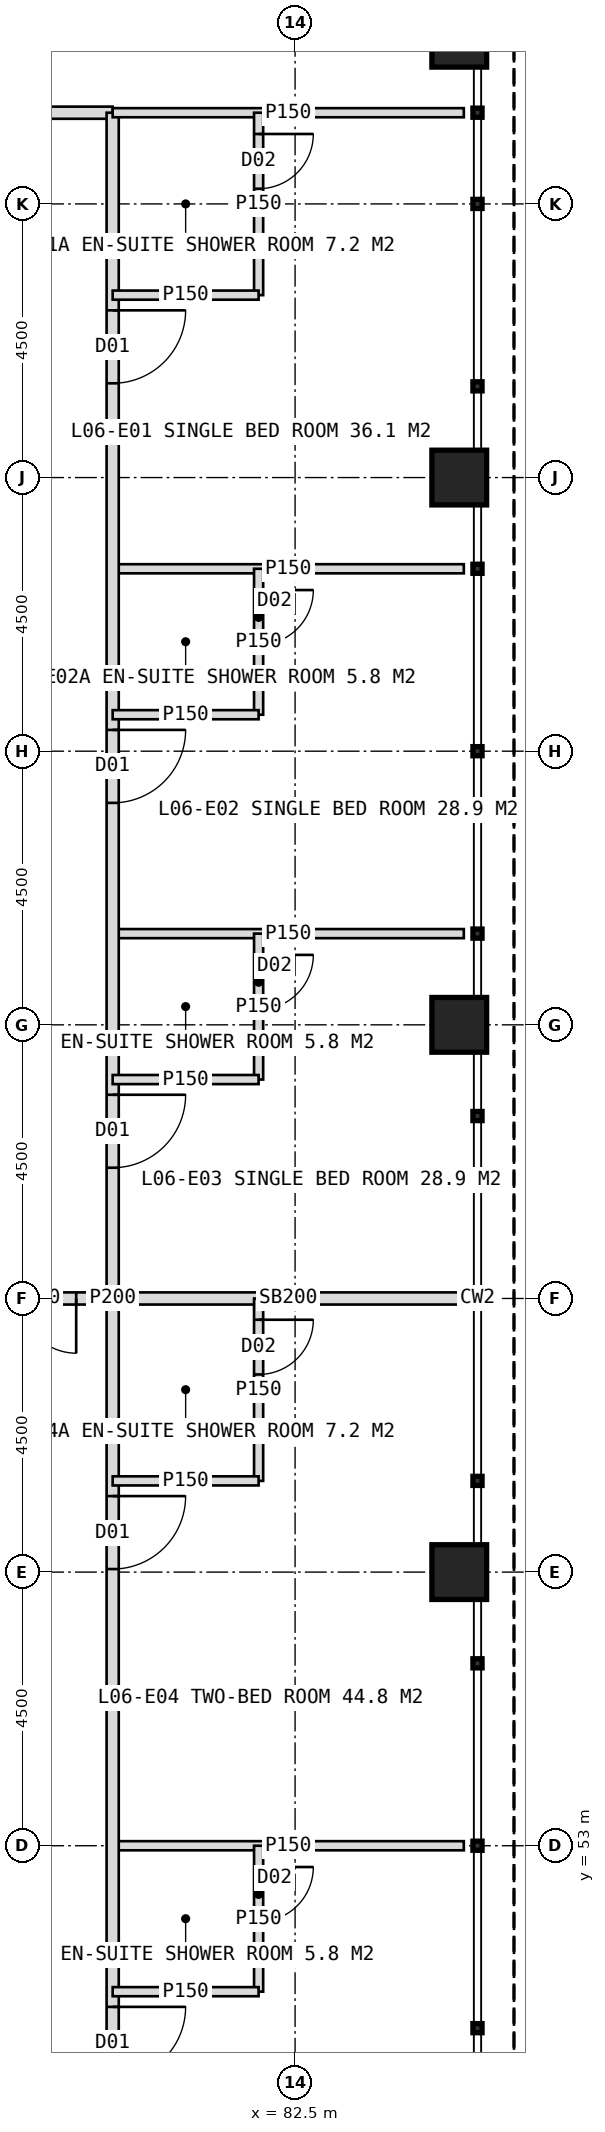
"""IFC4 building model, lengths in metres.
Left out: names, types, materials, properties, quantities, classifications, styles, units other than length and angle.
Written with IfcOpenShell. Run it as: python <this file> out.ifc"""

import sys

from ifc_helpers import new_model, si_unit, direction, frame, frame_2d, origin, origin_2d, place, context, subcontext, project, spatial, rectangle, hollow_rectangle, extrude, element, fill, save


model = new_model("IFC4")
c1 = context("Model", 3, precision=1e-05, world=origin(), true_north=direction((0.0, 1.0)))
c2 = subcontext(c1, "Body", "Model", "MODEL_VIEW")
j1 = project(units=[si_unit("LENGTHUNIT", "METRE"), si_unit("PLANEANGLEUNIT", "RADIAN")], contexts=[c1])
p1 = place(None, origin())
s1 = spatial("IfcSite", under=j1, at=p1, CompositionType="ELEMENT")
p2 = place(p1, origin())
s2 = spatial("IfcBuilding", under=s1, at=p2, CompositionType="ELEMENT")
p3 = place(p2, frame((0.0, 0.0, 31.0)))
s3 = spatial("IfcBuildingStorey", under=s2, at=p3, CompositionType="ELEMENT", Elevation=31.0)
for number, where, z_axis, x_axis in (
    (1, (85.2, 57.5, 0.0), (0.0, 0.0, 1.0), (1.0, 0.0, 0.0)),
    (2, (85.2, 66.5, 0.0), (0.0, 0.0, 1.0), (1.0, 0.0, 0.0)),
    (3, (85.2, 75.5, 0.0), (0.0, 0.0, 1.0), (1.0, 0.0, 0.0)),
    (4, (85.2, 82.7, 0.0), (0.0, 0.0, 1.0), (1.0, 0.0, 0.0)),
):
    element("IfcColumn", number, at=place(p3, frame(where, z_axis=z_axis, x_axis=x_axis)), inside=s3, PredefinedType="COLUMN", context=c2, shape_type="SweptSolid", body=[
        extrude(hollow_rectangle(XDim=0.9, YDim=0.9, WallThickness=0.08, at=origin_2d()), origin(), (0.0, 0.0, 1.0), 4.0),
    ])
p4 = place(p3, frame((40.5, 81.5, 0.0), z_axis=(0.0, 0.0, 1.0), x_axis=(1.0, 0.0, 0.0)))
e5 = element("IfcWall", 5, at=p4, inside=s3, PredefinedType="PARTITIONING", context=c2, shape_type="SweptSolid", body=[
    extrude(rectangle(XDim=39.0, YDim=0.2, at=frame_2d((19.5, 0.0))), origin(), (0.0, 0.0, 1.0), 3.75),
])
p5 = place(p4, frame((3.25, 0.0, 0.0)))
e6 = element("IfcOpeningElement", 6, at=p5, cuts=e5, PredefinedType="OPENING", context=c2, shape_type="SweptSolid", body=[
    extrude(rectangle(XDim=1.2, YDim=2.2, at=frame_2d((0.6, 1.1))), frame((0.0, 0.11, 0.0), z_axis=(0.0, -1.0, 0.0), x_axis=(1.0, 0.0, 0.0)), (0.0, 0.0, 1.0), 0.22),
])
p6 = place(p4, frame((13.75, 0.0, 0.0)))
e7 = element("IfcOpeningElement", 7, at=p6, cuts=e5, PredefinedType="OPENING", context=c2, shape_type="SweptSolid", body=[
    extrude(rectangle(XDim=1.2, YDim=2.2, at=frame_2d((0.6, 1.1))), frame((0.0, 0.11, 0.0), z_axis=(0.0, -1.0, 0.0), x_axis=(1.0, 0.0, 0.0)), (0.0, 0.0, 1.0), 0.22),
])
p7 = place(p4, frame((22.75, 0.0, 0.0)))
e8 = element("IfcOpeningElement", 8, at=p7, cuts=e5, PredefinedType="OPENING", context=c2, shape_type="SweptSolid", body=[
    extrude(rectangle(XDim=1.2, YDim=2.2, at=frame_2d((0.6, 1.1))), frame((0.0, 0.11, 0.0), z_axis=(0.0, -1.0, 0.0), x_axis=(1.0, 0.0, 0.0)), (0.0, 0.0, 1.0), 0.22),
])
p8 = place(p4, frame((33.25, 0.0, 0.0)))
e9 = element("IfcOpeningElement", 9, at=p8, cuts=e5, PredefinedType="OPENING", context=c2, shape_type="SweptSolid", body=[
    extrude(rectangle(XDim=1.0, YDim=2.1, at=frame_2d((0.5, 1.05))), frame((0.0, 0.11, 0.0), z_axis=(0.0, -1.0, 0.0), x_axis=(1.0, 0.0, 0.0)), (0.0, 0.0, 1.0), 0.22),
])
for number, where, z_axis, x_axis in (
    (10, (79.5, 74.0, 0.0), (0.0, 0.0, 1.0), (1.0, 0.0, 0.0)),
    (11, (79.5, 68.0, 0.0), (0.0, 0.0, 1.0), (1.0, 0.0, 0.0)),
):
    element("IfcWall", number, at=place(p3, frame(where, z_axis=z_axis, x_axis=x_axis)), inside=s3, PredefinedType="PARTITIONING", context=c2, shape_type="SweptSolid", body=[
        extrude(rectangle(XDim=5.775, YDim=0.15, at=frame_2d((2.887, 0.0))), origin(), (0.0, 0.0, 1.0), 3.75),
    ])
p9 = place(p3, frame((79.5, 62.0, 0.0), z_axis=(0.0, 0.0, 1.0), x_axis=(1.0, 0.0, 0.0)))
e12 = element("IfcWall", 12, at=p9, inside=s3, PredefinedType="SOLIDWALL", context=c2, shape_type="SweptSolid", body=[
    extrude(rectangle(XDim=5.775, YDim=0.2, at=frame_2d((2.887, 0.0))), origin(), (0.0, 0.0, 1.0), 2.75),
])
p10 = place(p3, frame((79.5, 53.0, 0.0), z_axis=(0.0, 0.0, 1.0), x_axis=(1.0, 0.0, 0.0)))
e13 = element("IfcWall", 13, at=p10, inside=s3, PredefinedType="PARTITIONING", context=c2, shape_type="SweptSolid", body=[
    extrude(rectangle(XDim=5.775, YDim=0.15, at=frame_2d((2.887, 0.0))), origin(), (0.0, 0.0, 1.0), 3.75),
])
p11 = place(p3, frame((79.5, 81.5, 0.0), z_axis=(0.0, 0.0, 1.0), x_axis=(0.0, -1.0, 0.0)))
e14 = element("IfcWall", 14, at=p11, inside=s3, PredefinedType="PARTITIONING", context=c2, shape_type="SweptSolid", body=[
    extrude(rectangle(XDim=39.0, YDim=0.2, at=frame_2d((19.5, 0.0))), origin(), (0.0, 0.0, 1.0), 3.75),
])
p12 = place(p11, frame((3.25, 0.0, 0.0)))
e15 = element("IfcOpeningElement", 15, at=p12, cuts=e14, PredefinedType="OPENING", context=c2, shape_type="SweptSolid", body=[
    extrude(rectangle(XDim=1.2, YDim=2.2, at=frame_2d((0.6, 1.1))), frame((0.0, 0.11, 0.0), z_axis=(0.0, -1.0, 0.0), x_axis=(1.0, 0.0, 0.0)), (0.0, 0.0, 1.0), 0.22),
])
p13 = place(p11, frame((10.15, 0.0, 0.0)))
e16 = element("IfcOpeningElement", 16, at=p13, cuts=e14, PredefinedType="OPENING", context=c2, shape_type="SweptSolid", body=[
    extrude(rectangle(XDim=1.2, YDim=2.2, at=frame_2d((0.6, 1.1))), frame((0.0, 0.11, 0.0), z_axis=(0.0, -1.0, 0.0), x_axis=(1.0, 0.0, 0.0)), (0.0, 0.0, 1.0), 0.22),
])
p14 = place(p11, frame((16.15, 0.0, 0.0)))
e17 = element("IfcOpeningElement", 17, at=p14, cuts=e14, PredefinedType="OPENING", context=c2, shape_type="SweptSolid", body=[
    extrude(rectangle(XDim=1.2, YDim=2.2, at=frame_2d((0.6, 1.1))), frame((0.0, 0.11, 0.0), z_axis=(0.0, -1.0, 0.0), x_axis=(1.0, 0.0, 0.0)), (0.0, 0.0, 1.0), 0.22),
])
p15 = place(p11, frame((22.75, 0.0, 0.0)))
e18 = element("IfcOpeningElement", 18, at=p15, cuts=e14, PredefinedType="OPENING", context=c2, shape_type="SweptSolid", body=[
    extrude(rectangle(XDim=1.2, YDim=2.2, at=frame_2d((0.6, 1.1))), frame((0.0, 0.11, 0.0), z_axis=(0.0, -1.0, 0.0), x_axis=(1.0, 0.0, 0.0)), (0.0, 0.0, 1.0), 0.22),
])
p16 = place(p11, frame((31.15, 0.0, 0.0)))
e19 = element("IfcOpeningElement", 19, at=p16, cuts=e14, PredefinedType="OPENING", context=c2, shape_type="SweptSolid", body=[
    extrude(rectangle(XDim=1.2, YDim=2.2, at=frame_2d((0.6, 1.1))), frame((0.0, 0.11, 0.0), z_axis=(0.0, -1.0, 0.0), x_axis=(1.0, 0.0, 0.0)), (0.0, 0.0, 1.0), 0.22),
])
p17 = place(p3, frame((79.5, 81.5, 0.0), z_axis=(0.0, 0.0, 1.0), x_axis=(1.0, 0.0, 0.0)))
e20 = element("IfcWall", 20, at=p17, inside=s3, PredefinedType="PARTITIONING", context=c2, shape_type="SweptSolid", body=[
    extrude(rectangle(XDim=5.775, YDim=0.15, at=frame_2d((2.887, 0.0))), origin(), (0.0, 0.0, 1.0), 3.75),
])
p18 = place(p3, frame((81.9, 81.5, 0.0), z_axis=(0.0, 0.0, 1.0), x_axis=(0.0, -1.0, 0.0)))
e21 = element("IfcWall", 21, at=p18, inside=s3, PredefinedType="PARTITIONING", context=c2, shape_type="SweptSolid", body=[
    extrude(rectangle(XDim=3.0, YDim=0.15, at=frame_2d((1.5, 0.0))), origin(), (0.0, 0.0, 1.0), 3.75),
])
p19 = place(p18, frame((0.35, 0.0, 0.0)))
e22 = element("IfcOpeningElement", 22, at=p19, cuts=e21, PredefinedType="OPENING", context=c2, shape_type="SweptSolid", body=[
    extrude(rectangle(XDim=0.9, YDim=2.1, at=frame_2d((0.45, 1.05))), frame((0.0, 0.085, 0.0), z_axis=(0.0, -1.0, 0.0), x_axis=(1.0, 0.0, 0.0)), (0.0, 0.0, 1.0), 0.17),
])
p20 = place(p3, frame((79.5, 78.5, 0.0), z_axis=(0.0, 0.0, 1.0), x_axis=(1.0, 0.0, 0.0)))
e23 = element("IfcWall", 23, at=p20, inside=s3, PredefinedType="PARTITIONING", context=c2, shape_type="SweptSolid", body=[
    extrude(rectangle(XDim=2.4, YDim=0.15, at=frame_2d((1.2, 0.0))), origin(), (0.0, 0.0, 1.0), 3.75),
])
p21 = place(p3, frame((81.9, 74.0, 0.0), z_axis=(0.0, 0.0, 1.0), x_axis=(0.0, -1.0, 0.0)))
e24 = element("IfcWall", 24, at=p21, inside=s3, PredefinedType="PARTITIONING", context=c2, shape_type="SweptSolid", body=[
    extrude(rectangle(XDim=2.4, YDim=0.15, at=frame_2d((1.2, 0.0))), origin(), (0.0, 0.0, 1.0), 3.75),
])
p22 = place(p21, frame((0.35, 0.0, 0.0)))
e25 = element("IfcOpeningElement", 25, at=p22, cuts=e24, PredefinedType="OPENING", context=c2, shape_type="SweptSolid", body=[
    extrude(rectangle(XDim=0.9, YDim=2.1, at=frame_2d((0.45, 1.05))), frame((0.0, 0.085, 0.0), z_axis=(0.0, -1.0, 0.0), x_axis=(1.0, 0.0, 0.0)), (0.0, 0.0, 1.0), 0.17),
])
p23 = place(p3, frame((79.5, 71.6, 0.0), z_axis=(0.0, 0.0, 1.0), x_axis=(1.0, 0.0, 0.0)))
e26 = element("IfcWall", 26, at=p23, inside=s3, PredefinedType="PARTITIONING", context=c2, shape_type="SweptSolid", body=[
    extrude(rectangle(XDim=2.4, YDim=0.15, at=frame_2d((1.2, 0.0))), origin(), (0.0, 0.0, 1.0), 3.75),
])
p24 = place(p3, frame((81.9, 68.0, 0.0), z_axis=(0.0, 0.0, 1.0), x_axis=(0.0, -1.0, 0.0)))
e27 = element("IfcWall", 27, at=p24, inside=s3, PredefinedType="PARTITIONING", context=c2, shape_type="SweptSolid", body=[
    extrude(rectangle(XDim=2.4, YDim=0.15, at=frame_2d((1.2, 0.0))), origin(), (0.0, 0.0, 1.0), 3.75),
])
p25 = place(p24, frame((0.35, 0.0, 0.0)))
e28 = element("IfcOpeningElement", 28, at=p25, cuts=e27, PredefinedType="OPENING", context=c2, shape_type="SweptSolid", body=[
    extrude(rectangle(XDim=0.9, YDim=2.1, at=frame_2d((0.45, 1.05))), frame((0.0, 0.085, 0.0), z_axis=(0.0, -1.0, 0.0), x_axis=(1.0, 0.0, 0.0)), (0.0, 0.0, 1.0), 0.17),
])
p26 = place(p3, frame((79.5, 65.6, 0.0), z_axis=(0.0, 0.0, 1.0), x_axis=(1.0, 0.0, 0.0)))
e29 = element("IfcWall", 29, at=p26, inside=s3, PredefinedType="PARTITIONING", context=c2, shape_type="SweptSolid", body=[
    extrude(rectangle(XDim=2.4, YDim=0.15, at=frame_2d((1.2, 0.0))), origin(), (0.0, 0.0, 1.0), 3.75),
])
p27 = place(p3, frame((81.9, 62.0, 0.0), z_axis=(0.0, 0.0, 1.0), x_axis=(0.0, -1.0, 0.0)))
e30 = element("IfcWall", 30, at=p27, inside=s3, PredefinedType="PARTITIONING", context=c2, shape_type="SweptSolid", body=[
    extrude(rectangle(XDim=3.0, YDim=0.15, at=frame_2d((1.5, 0.0))), origin(), (0.0, 0.0, 1.0), 3.75),
])
p28 = place(p27, frame((0.35, 0.0, 0.0)))
e31 = element("IfcOpeningElement", 31, at=p28, cuts=e30, PredefinedType="OPENING", context=c2, shape_type="SweptSolid", body=[
    extrude(rectangle(XDim=0.9, YDim=2.1, at=frame_2d((0.45, 1.05))), frame((0.0, 0.085, 0.0), z_axis=(0.0, -1.0, 0.0), x_axis=(1.0, 0.0, 0.0)), (0.0, 0.0, 1.0), 0.17),
])
p29 = place(p3, frame((79.5, 59.0, 0.0), z_axis=(0.0, 0.0, 1.0), x_axis=(1.0, 0.0, 0.0)))
e32 = element("IfcWall", 32, at=p29, inside=s3, PredefinedType="PARTITIONING", context=c2, shape_type="SweptSolid", body=[
    extrude(rectangle(XDim=2.4, YDim=0.15, at=frame_2d((1.2, 0.0))), origin(), (0.0, 0.0, 1.0), 3.75),
])
p30 = place(p3, frame((81.9, 53.0, 0.0), z_axis=(0.0, 0.0, 1.0), x_axis=(0.0, -1.0, 0.0)))
e33 = element("IfcWall", 33, at=p30, inside=s3, PredefinedType="PARTITIONING", context=c2, shape_type="SweptSolid", body=[
    extrude(rectangle(XDim=2.4, YDim=0.15, at=frame_2d((1.2, 0.0))), origin(), (0.0, 0.0, 1.0), 3.75),
])
p31 = place(p30, frame((0.35, 0.0, 0.0)))
e34 = element("IfcOpeningElement", 34, at=p31, cuts=e33, PredefinedType="OPENING", context=c2, shape_type="SweptSolid", body=[
    extrude(rectangle(XDim=0.9, YDim=2.1, at=frame_2d((0.45, 1.05))), frame((0.0, 0.085, 0.0), z_axis=(0.0, -1.0, 0.0), x_axis=(1.0, 0.0, 0.0)), (0.0, 0.0, 1.0), 0.17),
])
p32 = place(p3, frame((79.5, 50.6, 0.0), z_axis=(0.0, 0.0, 1.0), x_axis=(1.0, 0.0, 0.0)))
e35 = element("IfcWall", 35, at=p32, inside=s3, PredefinedType="PARTITIONING", context=c2, shape_type="SweptSolid", body=[
    extrude(rectangle(XDim=2.4, YDim=0.15, at=frame_2d((1.2, 0.0))), origin(), (0.0, 0.0, 1.0), 3.75),
])
p33 = place(p3, frame((76.8, 62.0, 0.0), z_axis=(0.0, 0.0, 1.0), x_axis=(1.0, 0.0, 0.0)))
e36 = element("IfcWall", 36, at=p33, inside=s3, PredefinedType="SOLIDWALL", context=c2, shape_type="SweptSolid", body=[
    extrude(rectangle(XDim=2.7, YDim=0.2, at=frame_2d((1.35, 0.0))), origin(), (0.0, 0.0, 1.0), 2.75),
])
p34 = place(p33, frame((0.3, 0.0, 0.0)))
e37 = element("IfcOpeningElement", 37, at=p34, cuts=e36, PredefinedType="OPENING", context=c2, shape_type="SweptSolid", body=[
    extrude(rectangle(XDim=1.8, YDim=2.2, at=frame_2d((0.9, 1.1))), frame((0.0, 0.11, 0.0), z_axis=(0.0, -1.0, 0.0), x_axis=(1.0, 0.0, 0.0)), (0.0, 0.0, 1.0), 0.22),
])
p35 = place(p12, origin())
e38 = element("IfcDoor", 38, at=p35, inside=s3, OperationType="SINGLE_SWING_LEFT", PredefinedType="DOOR", context=c2, shape_type="SweptSolid", body=[
    extrude(rectangle(XDim=1.2, YDim=2.2, at=frame_2d((0.6, 1.1))), frame((0.0, 0.025, 0.0), z_axis=(0.0, -1.0, 0.0), x_axis=(1.0, 0.0, 0.0)), (0.0, 0.0, 1.0), 0.05),
])
fill(e15, e38)
p36 = place(p19, origin())
e39 = element("IfcDoor", 39, at=p36, inside=s3, OperationType="SINGLE_SWING_LEFT", PredefinedType="DOOR", context=c2, shape_type="SweptSolid", body=[
    extrude(rectangle(XDim=0.9, YDim=2.1, at=frame_2d((0.45, 1.05))), frame((0.0, 0.025, 0.0), z_axis=(0.0, -1.0, 0.0), x_axis=(1.0, 0.0, 0.0)), (0.0, 0.0, 1.0), 0.05),
])
fill(e22, e39)
p37 = place(p13, origin())
e40 = element("IfcDoor", 40, at=p37, inside=s3, OperationType="SINGLE_SWING_LEFT", PredefinedType="DOOR", context=c2, shape_type="SweptSolid", body=[
    extrude(rectangle(XDim=1.2, YDim=2.2, at=frame_2d((0.6, 1.1))), frame((0.0, 0.025, 0.0), z_axis=(0.0, -1.0, 0.0), x_axis=(1.0, 0.0, 0.0)), (0.0, 0.0, 1.0), 0.05),
])
fill(e16, e40)
p38 = place(p22, origin())
e41 = element("IfcDoor", 41, at=p38, inside=s3, OperationType="SINGLE_SWING_LEFT", PredefinedType="DOOR", context=c2, shape_type="SweptSolid", body=[
    extrude(rectangle(XDim=0.9, YDim=2.1, at=frame_2d((0.45, 1.05))), frame((0.0, 0.025, 0.0), z_axis=(0.0, -1.0, 0.0), x_axis=(1.0, 0.0, 0.0)), (0.0, 0.0, 1.0), 0.05),
])
fill(e25, e41)
p39 = place(p14, origin())
e42 = element("IfcDoor", 42, at=p39, inside=s3, OperationType="SINGLE_SWING_LEFT", PredefinedType="DOOR", context=c2, shape_type="SweptSolid", body=[
    extrude(rectangle(XDim=1.2, YDim=2.2, at=frame_2d((0.6, 1.1))), frame((0.0, 0.025, 0.0), z_axis=(0.0, -1.0, 0.0), x_axis=(1.0, 0.0, 0.0)), (0.0, 0.0, 1.0), 0.05),
])
fill(e17, e42)
p40 = place(p25, origin())
e43 = element("IfcDoor", 43, at=p40, inside=s3, OperationType="SINGLE_SWING_LEFT", PredefinedType="DOOR", context=c2, shape_type="SweptSolid", body=[
    extrude(rectangle(XDim=0.9, YDim=2.1, at=frame_2d((0.45, 1.05))), frame((0.0, 0.025, 0.0), z_axis=(0.0, -1.0, 0.0), x_axis=(1.0, 0.0, 0.0)), (0.0, 0.0, 1.0), 0.05),
])
fill(e28, e43)
p41 = place(p15, origin())
e44 = element("IfcDoor", 44, at=p41, inside=s3, OperationType="SINGLE_SWING_LEFT", PredefinedType="DOOR", context=c2, shape_type="SweptSolid", body=[
    extrude(rectangle(XDim=1.2, YDim=2.2, at=frame_2d((0.6, 1.1))), frame((0.0, 0.025, 0.0), z_axis=(0.0, -1.0, 0.0), x_axis=(1.0, 0.0, 0.0)), (0.0, 0.0, 1.0), 0.05),
])
fill(e18, e44)
p42 = place(p28, origin())
e45 = element("IfcDoor", 45, at=p42, inside=s3, OperationType="SINGLE_SWING_LEFT", PredefinedType="DOOR", context=c2, shape_type="SweptSolid", body=[
    extrude(rectangle(XDim=0.9, YDim=2.1, at=frame_2d((0.45, 1.05))), frame((0.0, 0.025, 0.0), z_axis=(0.0, -1.0, 0.0), x_axis=(1.0, 0.0, 0.0)), (0.0, 0.0, 1.0), 0.05),
])
fill(e31, e45)
p43 = place(p16, origin())
e46 = element("IfcDoor", 46, at=p43, inside=s3, OperationType="SINGLE_SWING_LEFT", PredefinedType="DOOR", context=c2, shape_type="SweptSolid", body=[
    extrude(rectangle(XDim=1.2, YDim=2.2, at=frame_2d((0.6, 1.1))), frame((0.0, 0.025, 0.0), z_axis=(0.0, -1.0, 0.0), x_axis=(1.0, 0.0, 0.0)), (0.0, 0.0, 1.0), 0.05),
])
fill(e19, e46)
p44 = place(p31, origin())
e47 = element("IfcDoor", 47, at=p44, inside=s3, OperationType="SINGLE_SWING_LEFT", PredefinedType="DOOR", context=c2, shape_type="SweptSolid", body=[
    extrude(rectangle(XDim=0.9, YDim=2.1, at=frame_2d((0.45, 1.05))), frame((0.0, 0.025, 0.0), z_axis=(0.0, -1.0, 0.0), x_axis=(1.0, 0.0, 0.0)), (0.0, 0.0, 1.0), 0.05),
])
fill(e34, e47)
p45 = place(p34, origin())
e48 = element("IfcDoor", 48, at=p45, inside=s3, OperationType="DOUBLE_DOOR_DOUBLE_SWING", PredefinedType="DOOR", context=c2, shape_type="SweptSolid", body=[
    extrude(rectangle(XDim=1.8, YDim=2.2, at=frame_2d((0.9, 1.1))), frame((0.0, 0.025, 0.0), z_axis=(0.0, -1.0, 0.0), x_axis=(1.0, 0.0, 0.0)), (0.0, 0.0, 1.0), 0.05),
])
fill(e37, e48)
save(model, sys.argv[1])
